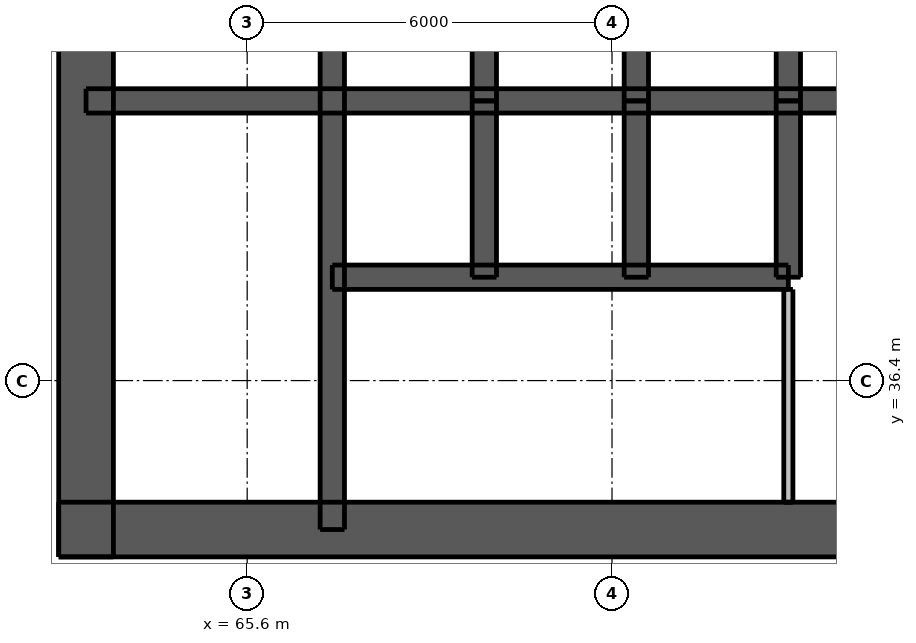
"""IFC4 building model, lengths in metres.
Left out: names, types, materials, properties, quantities, classifications, styles, units other than length and angle.
Written with IfcOpenShell. Run it as: python <this file> out.ifc"""

import sys

from ifc_helpers import new_model, si_unit, direction, frame, frame_2d, origin, place, context, subcontext, project, spatial, rectangle, extrude, element, fill, save


model = new_model("IFC4")
c1 = context("Model", 3, precision=1e-05, world=origin(), true_north=direction((0.0, 1.0)))
c2 = subcontext(c1, "Body", "Model", "MODEL_VIEW")
j1 = project(units=[si_unit("LENGTHUNIT", "METRE"), si_unit("PLANEANGLEUNIT", "RADIAN")], contexts=[c1])
p1 = place(None, origin())
s1 = spatial("IfcSite", under=j1, at=p1, CompositionType="ELEMENT")
p2 = place(p1, origin())
s2 = spatial("IfcBuilding", under=s1, at=p2, CompositionType="ELEMENT")
p3 = place(p2, frame((0.0, 0.0, 53.2)))
s3 = spatial("IfcBuildingStorey", under=s2, at=p3, CompositionType="ELEMENT", Elevation=53.2)
p4 = place(p3, frame((62.5, 33.95, 0.0), z_axis=(0.0, 0.0, 1.0), x_axis=(1.0, 0.0, 0.0)))
e1 = element("IfcWall", 1, at=p4, inside=s3, PredefinedType="SHEAR", context=c2, shape_type="SweptSolid", body=[
    extrude(rectangle(XDim=24.0, YDim=0.9, at=frame_2d((12.0, 0.0))), origin(), (0.0, 0.0, 1.0), 3.05),
])
p5 = place(p4, frame((2.05, 0.0, 0.0)))
e2 = element("IfcOpeningElement", 2, at=p5, cuts=e1, PredefinedType="OPENING", context=c2, shape_type="SweptSolid", body=[
    extrude(rectangle(XDim=1.1, YDim=2.1, at=frame_2d((0.55, 1.05))), frame((0.0, 0.46, 0.0), z_axis=(0.0, -1.0, 0.0), x_axis=(1.0, 0.0, 0.0)), (0.0, 0.0, 1.0), 0.92),
])
p6 = place(p4, frame((20.85, 0.0, 0.0)))
e3 = element("IfcOpeningElement", 3, at=p6, cuts=e1, PredefinedType="OPENING", context=c2, shape_type="SweptSolid", body=[
    extrude(rectangle(XDim=1.1, YDim=2.1, at=frame_2d((0.55, 1.05))), frame((0.0, 0.46, 0.0), z_axis=(0.0, -1.0, 0.0), x_axis=(1.0, 0.0, 0.0)), (0.0, 0.0, 1.0), 0.92),
])
p7 = place(p4, frame((8.0, 0.0, 0.0)))
e4 = element("IfcOpeningElement", 4, at=p7, cuts=e1, PredefinedType="OPENING", context=c2, shape_type="SweptSolid", body=[
    extrude(rectangle(XDim=1.1, YDim=2.1, at=frame_2d((0.55, 1.05))), frame((0.0, 0.46, 0.0), z_axis=(0.0, -1.0, 0.0), x_axis=(1.0, 0.0, 0.0)), (0.0, 0.0, 1.0), 0.92),
])
p8 = place(p4, frame((13.525, 0.0, 0.0)))
e5 = element("IfcOpeningElement", 5, at=p8, cuts=e1, PredefinedType="OPENING", context=c2, shape_type="SweptSolid", body=[
    extrude(rectangle(XDim=0.9, YDim=2.1, at=frame_2d((0.45, 1.05))), frame((0.0, 0.46, 0.0), z_axis=(0.0, -1.0, 0.0), x_axis=(1.0, 0.0, 0.0)), (0.0, 0.0, 1.0), 0.92),
])
p9 = place(p4, frame((17.075, 0.0, 0.0)))
e6 = element("IfcOpeningElement", 6, at=p9, cuts=e1, PredefinedType="OPENING", context=c2, shape_type="SweptSolid", body=[
    extrude(rectangle(XDim=0.9, YDim=2.1, at=frame_2d((0.45, 1.05))), frame((0.0, 0.46, 0.0), z_axis=(0.0, -1.0, 0.0), x_axis=(1.0, 0.0, 0.0)), (0.0, 0.0, 1.0), 0.92),
])
p10 = place(p3, frame((62.95, 33.5, 0.0), z_axis=(0.0, 0.0, 1.0), x_axis=(0.0, 1.0, 0.0)))
e7 = element("IfcWall", 7, at=p10, inside=s3, PredefinedType="SHEAR", context=c2, shape_type="SweptSolid", body=[
    extrude(rectangle(XDim=24.0, YDim=0.9, at=frame_2d((12.0, 0.0))), origin(), (0.0, 0.0, 1.0), 3.05),
])
p11 = place(p10, frame((11.2, 0.0, 0.0)))
e8 = element("IfcOpeningElement", 8, at=p11, cuts=e7, PredefinedType="OPENING", context=c2, shape_type="SweptSolid", body=[
    extrude(rectangle(XDim=1.6, YDim=2.1, at=frame_2d((0.8, 1.05))), frame((0.0, 0.46, 0.0), z_axis=(0.0, -1.0, 0.0), x_axis=(1.0, 0.0, 0.0)), (0.0, 0.0, 1.0), 0.92),
])
p12 = place(p3, frame((62.95, 41.0, 0.0), z_axis=(0.0, 0.0, 1.0), x_axis=(1.0, 0.0, 0.0)))
e9 = element("IfcWall", 9, at=p12, inside=s3, PredefinedType="SHEAR", context=c2, shape_type="SweptSolid", body=[
    extrude(rectangle(XDim=23.1, YDim=0.4, at=frame_2d((11.55, 0.0))), origin(), (0.0, 0.0, 1.0), 3.05),
])
p13 = place(p3, frame((67.0, 33.95, 0.0), z_axis=(0.0, 0.0, 1.0), x_axis=(0.0, 1.0, 0.0)))
e10 = element("IfcWall", 10, at=p13, inside=s3, PredefinedType="SHEAR", context=c2, shape_type="SweptSolid", body=[
    extrude(rectangle(XDim=9.95, YDim=0.4, at=frame_2d((4.975, 0.0))), origin(), (0.0, 0.0, 1.0), 3.05),
])
p14 = place(p13, frame((0.65, 0.0, 0.0)))
e11 = element("IfcOpeningElement", 11, at=p14, cuts=e10, PredefinedType="OPENING", context=c2, shape_type="SweptSolid", body=[
    extrude(rectangle(XDim=1.1, YDim=2.1, at=frame_2d((0.55, 1.05))), frame((0.0, 0.21, 0.0), z_axis=(0.0, -1.0, 0.0), x_axis=(1.0, 0.0, 0.0)), (0.0, 0.0, 1.0), 0.42),
])
for number, where, z_axis, x_axis in (
    (12, (69.5, 41.0, 0.0), (0.0, 0.0, 1.0), (0.0, 1.0, 0.0)),
    (13, (72.0, 41.0, 0.0), (0.0, 0.0, 1.0), (0.0, 1.0, 0.0)),
    (14, (74.5, 41.0, 0.0), (0.0, 0.0, 1.0), (0.0, 1.0, 0.0)),
):
    element("IfcWall", number, at=place(p3, frame(where, z_axis=z_axis, x_axis=x_axis)), inside=s3, PredefinedType="SHEAR", context=c2, shape_type="SweptSolid", body=[
        extrude(rectangle(XDim=2.9, YDim=0.4, at=frame_2d((1.45, 0.0))), origin(), (0.0, 0.0, 1.0), 3.05),
    ])
p15 = place(p3, frame((67.0, 38.1, 0.0), z_axis=(0.0, 0.0, 1.0), x_axis=(1.0, 0.0, 0.0)))
e15 = element("IfcWall", 15, at=p15, inside=s3, PredefinedType="SHEAR", context=c2, shape_type="SweptSolid", body=[
    extrude(rectangle(XDim=7.5, YDim=0.4, at=frame_2d((3.75, 0.0))), origin(), (0.0, 0.0, 1.0), 3.05),
])
p16 = place(p15, frame((0.7, 0.0, 0.0)))
e16 = element("IfcOpeningElement", 16, at=p16, cuts=e15, PredefinedType="OPENING", context=c2, shape_type="SweptSolid", body=[
    extrude(rectangle(XDim=1.1, YDim=2.1, at=frame_2d((0.55, 1.05))), frame((0.0, 0.21, 0.0), z_axis=(0.0, -1.0, 0.0), x_axis=(1.0, 0.0, 0.0)), (0.0, 0.0, 1.0), 0.42),
])
p17 = place(p15, frame((3.2, 0.0, 0.0)))
e17 = element("IfcOpeningElement", 17, at=p17, cuts=e15, PredefinedType="OPENING", context=c2, shape_type="SweptSolid", body=[
    extrude(rectangle(XDim=1.1, YDim=2.1, at=frame_2d((0.55, 1.05))), frame((0.0, 0.21, 0.0), z_axis=(0.0, -1.0, 0.0), x_axis=(1.0, 0.0, 0.0)), (0.0, 0.0, 1.0), 0.42),
])
p18 = place(p15, frame((5.65, 0.0, 0.0)))
e18 = element("IfcOpeningElement", 18, at=p18, cuts=e15, PredefinedType="OPENING", context=c2, shape_type="SweptSolid", body=[
    extrude(rectangle(XDim=1.2, YDim=2.1, at=frame_2d((0.6, 1.05))), frame((0.0, 0.21, 0.0), z_axis=(0.0, -1.0, 0.0), x_axis=(1.0, 0.0, 0.0)), (0.0, 0.0, 1.0), 0.42),
])
for number, where, z_axis, x_axis in (
    (19, (69.5, 38.1, 0.0), (0.0, 0.0, 1.0), (0.0, 1.0, 0.0)),
    (20, (72.0, 38.1, 0.0), (0.0, 0.0, 1.0), (0.0, 1.0, 0.0)),
    (21, (74.5, 38.1, 0.0), (0.0, 0.0, 1.0), (0.0, 1.0, 0.0)),
):
    element("IfcWall", number, at=place(p3, frame(where, z_axis=z_axis, x_axis=x_axis)), inside=s3, PredefinedType="SHEAR", context=c2, shape_type="SweptSolid", body=[
        extrude(rectangle(XDim=2.9, YDim=0.4, at=frame_2d((1.45, 0.0))), origin(), (0.0, 0.0, 1.0), 3.05),
    ])
p19 = place(p3, frame((74.5, 34.4, 0.0), z_axis=(0.0, 0.0, 1.0), x_axis=(0.0, 1.0, 0.0)))
e22 = element("IfcWall", 22, at=p19, inside=s3, PredefinedType="PLUMBINGWALL", context=c2, shape_type="SweptSolid", body=[
    extrude(rectangle(XDim=3.5, YDim=0.15, at=frame_2d((1.75, 0.0))), origin(), (0.0, 0.0, 1.0), 3.05),
])
p20 = place(p5, origin())
e23 = element("IfcDoor", 23, at=p20, inside=s3, OperationType="SINGLE_SWING_LEFT", PredefinedType="DOOR", context=c2, shape_type="SweptSolid", body=[
    extrude(rectangle(XDim=1.1, YDim=2.1, at=frame_2d((0.55, 1.05))), frame((0.0, 0.438, 0.0), z_axis=(0.0, -1.0, 0.0), x_axis=(1.0, 0.0, 0.0)), (0.0, 0.0, 1.0), 0.05),
])
fill(e2, e23)
p21 = place(p7, origin())
e24 = element("IfcDoor", 24, at=p21, inside=s3, OperationType="SINGLE_SWING_LEFT", PredefinedType="DOOR", context=c2, shape_type="SweptSolid", body=[
    extrude(rectangle(XDim=1.1, YDim=2.1, at=frame_2d((0.55, 1.05))), frame((0.0, 0.438, 0.0), z_axis=(0.0, -1.0, 0.0), x_axis=(1.0, 0.0, 0.0)), (0.0, 0.0, 1.0), 0.05),
])
fill(e4, e24)
p22 = place(p14, origin())
e25 = element("IfcDoor", 25, at=p22, inside=s3, OperationType="SINGLE_SWING_RIGHT", PredefinedType="DOOR", context=c2, shape_type="SweptSolid", body=[
    extrude(rectangle(XDim=1.1, YDim=2.1, at=frame_2d((0.55, 1.05))), frame((0.0, -0.138, 0.0), z_axis=(0.0, -1.0, 0.0), x_axis=(1.0, 0.0, 0.0)), (0.0, 0.0, 1.0), 0.05),
])
fill(e11, e25)
p23 = place(p16, origin())
e26 = element("IfcDoor", 26, at=p23, inside=s3, OperationType="DOUBLE_DOOR_SLIDING", PredefinedType="DOOR", context=c2, shape_type="SweptSolid", body=[
    extrude(rectangle(XDim=1.1, YDim=2.1, at=frame_2d((0.55, 1.05))), frame((0.0, 0.025, 0.0), z_axis=(0.0, -1.0, 0.0), x_axis=(1.0, 0.0, 0.0)), (0.0, 0.0, 1.0), 0.05),
])
fill(e16, e26)
p24 = place(p17, origin())
e27 = element("IfcDoor", 27, at=p24, inside=s3, OperationType="DOUBLE_DOOR_SLIDING", PredefinedType="DOOR", context=c2, shape_type="SweptSolid", body=[
    extrude(rectangle(XDim=1.1, YDim=2.1, at=frame_2d((0.55, 1.05))), frame((0.0, 0.025, 0.0), z_axis=(0.0, -1.0, 0.0), x_axis=(1.0, 0.0, 0.0)), (0.0, 0.0, 1.0), 0.05),
])
fill(e17, e27)
p25 = place(p18, origin())
e28 = element("IfcDoor", 28, at=p25, inside=s3, OperationType="DOUBLE_DOOR_SLIDING", PredefinedType="DOOR", context=c2, shape_type="SweptSolid", body=[
    extrude(rectangle(XDim=1.2, YDim=2.1, at=frame_2d((0.6, 1.05))), frame((0.0, 0.025, 0.0), z_axis=(0.0, -1.0, 0.0), x_axis=(1.0, 0.0, 0.0)), (0.0, 0.0, 1.0), 0.05),
])
fill(e18, e28)
save(model, sys.argv[1])
